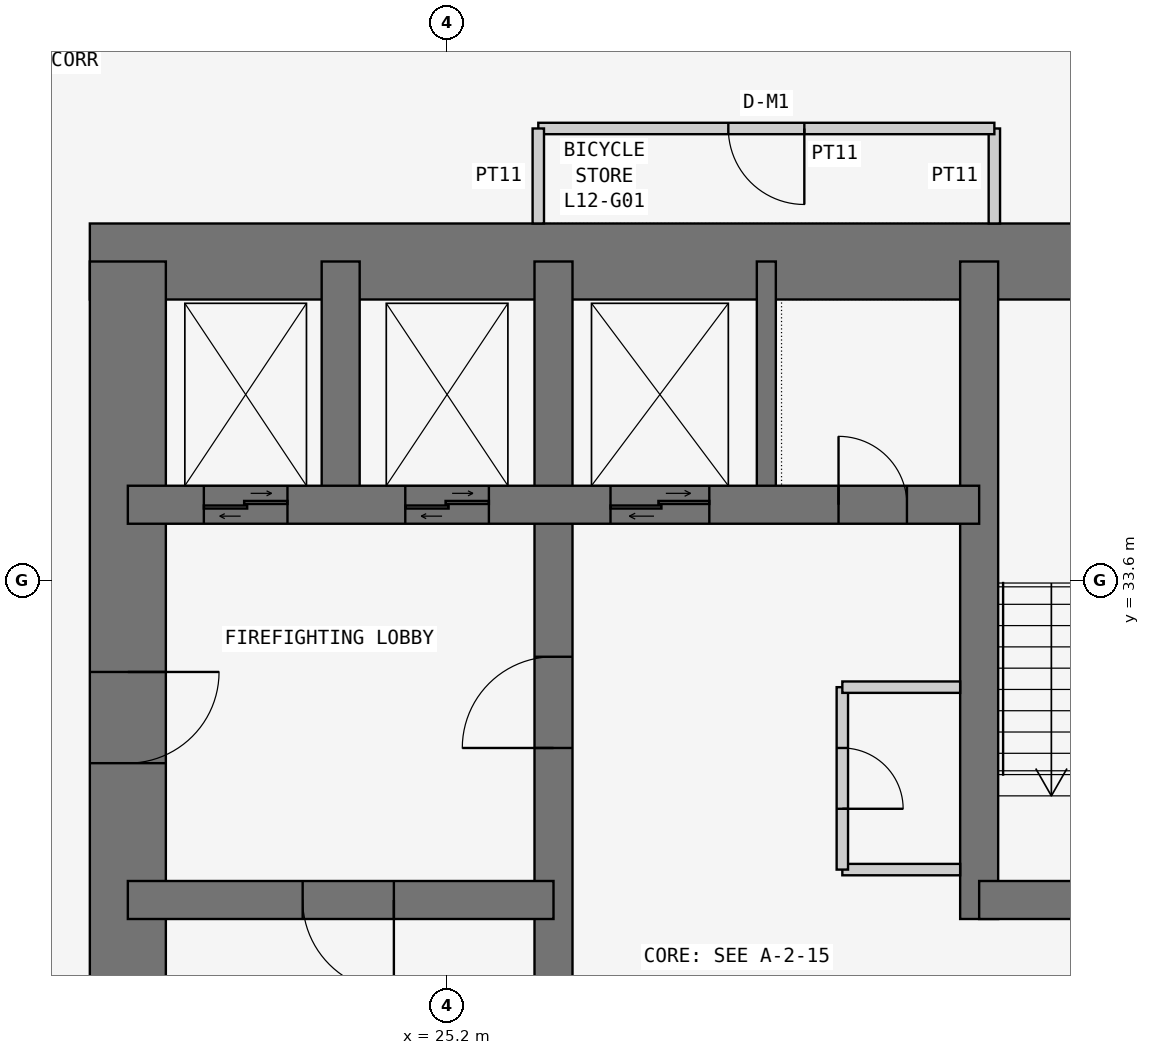
"""IFC4 building model, lengths in metres.
Left out: names, types, materials, properties, quantities, classifications, styles, units other than length and angle.
Written with IfcOpenShell. Run it as: python <this file> out.ifc"""

import sys

from ifc_helpers import new_model, si_unit, direction, frame, frame_2d, origin, place, context, subcontext, project, spatial, rectangle, extrude, element, fill, save


model = new_model("IFC4")
c1 = context("Model", 3, precision=1e-05, world=origin(), true_north=direction((0.0, 1.0)))
c2 = subcontext(c1, "Body", "Model", "MODEL_VIEW")
j1 = project(units=[si_unit("LENGTHUNIT", "METRE"), si_unit("PLANEANGLEUNIT", "RADIAN")], contexts=[c1])
p1 = place(None, origin())
s1 = spatial("IfcSite", under=j1, at=p1, CompositionType="ELEMENT")
p2 = place(p1, origin())
s2 = spatial("IfcBuilding", under=s1, at=p2, CompositionType="ELEMENT")
p3 = place(p2, frame((0.0, 0.0, 52.5)))
s3 = spatial("IfcBuildingStorey", under=s2, at=p3, CompositionType="ELEMENT", Elevation=52.5)
p4 = place(p3, frame((37.8, 37.8, 0.0), z_axis=(0.0, 0.0, 1.0), x_axis=(-1.0, 0.0, 0.0)))
e1 = element("IfcWall", 1, at=p4, inside=s3, PredefinedType="SHEAR", context=c2, shape_type="SweptSolid", body=[
    extrude(rectangle(XDim=17.3, YDim=1.0, at=frame_2d((8.65, 0.0))), origin(), (0.0, 0.0, 1.0), 3.6),
])
p5 = place(p3, frame((21.0, 37.8, 0.0), z_axis=(0.0, 0.0, 1.0), x_axis=(0.0, -1.0, 0.0)))
e2 = element("IfcWall", 2, at=p5, inside=s3, PredefinedType="SHEAR", context=c2, shape_type="SweptSolid", body=[
    extrude(rectangle(XDim=17.3, YDim=1.0, at=frame_2d((8.65, 0.0))), origin(), (0.0, 0.0, 1.0), 3.6),
])
p6 = place(p5, frame((5.4, 0.0, 0.0)))
e3 = element("IfcOpeningElement", 3, at=p6, cuts=e2, PredefinedType="OPENING", context=c2, shape_type="SweptSolid", body=[
    extrude(rectangle(XDim=1.2, YDim=2.1, at=frame_2d((0.6, 1.05))), frame((0.0, 0.51, 0.0), z_axis=(0.0, -1.0, 0.0), x_axis=(1.0, 0.0, 0.0)), (0.0, 0.0, 1.0), 1.02),
])
p7 = place(p3, frame((26.6, 21.0, 0.0), z_axis=(0.0, 0.0, 1.0), x_axis=(0.0, 1.0, 0.0)))
e4 = element("IfcWall", 4, at=p7, inside=s3, PredefinedType="SHEAR", context=c2, shape_type="SweptSolid", body=[
    extrude(rectangle(XDim=16.8, YDim=0.5, at=frame_2d((8.4, 0.0))), origin(), (0.0, 0.0, 1.0), 3.6),
])
p8 = place(p7, frame((10.4, 0.0, 0.0)))
e5 = element("IfcOpeningElement", 5, at=p8, cuts=e4, PredefinedType="OPENING", context=c2, shape_type="SweptSolid", body=[
    extrude(rectangle(XDim=1.2, YDim=2.1, at=frame_2d((0.6, 1.05))), frame((0.0, 0.26, 0.0), z_axis=(0.0, -1.0, 0.0), x_axis=(1.0, 0.0, 0.0)), (0.0, 0.0, 1.0), 0.52),
])
p9 = place(p3, frame((21.0, 29.4, 0.0), z_axis=(0.0, 0.0, 1.0), x_axis=(1.0, 0.0, 0.0)))
e6 = element("IfcWall", 6, at=p9, inside=s3, PredefinedType="SHEAR", context=c2, shape_type="SweptSolid", body=[
    extrude(rectangle(XDim=5.6, YDim=0.5, at=frame_2d((2.8, 0.0))), origin(), (0.0, 0.0, 1.0), 3.6),
])
p10 = place(p9, frame((2.3, 0.0, 0.0)))
e7 = element("IfcOpeningElement", 7, at=p10, cuts=e6, PredefinedType="OPENING", context=c2, shape_type="SweptSolid", body=[
    extrude(rectangle(XDim=1.2, YDim=2.1, at=frame_2d((0.6, 1.05))), frame((0.0, 0.26, 0.0), z_axis=(0.0, -1.0, 0.0), x_axis=(1.0, 0.0, 0.0)), (0.0, 0.0, 1.0), 0.52),
])
p11 = place(p3, frame((21.0, 34.6, 0.0), z_axis=(0.0, 0.0, 1.0), x_axis=(1.0, 0.0, 0.0)))
e8 = element("IfcWall", 8, at=p11, inside=s3, PredefinedType="SHEAR", context=c2, shape_type="SweptSolid", body=[
    extrude(rectangle(XDim=11.2, YDim=0.5, at=frame_2d((5.6, 0.0))), origin(), (0.0, 0.0, 1.0), 3.6),
])
p12 = place(p11, frame((9.35, 0.0, 0.0)))
e9 = element("IfcOpeningElement", 9, at=p12, cuts=e8, PredefinedType="OPENING", context=c2, shape_type="SweptSolid", body=[
    extrude(rectangle(XDim=0.9, YDim=2.1, at=frame_2d((0.45, 1.05))), frame((0.0, 0.26, 0.0), z_axis=(0.0, -1.0, 0.0), x_axis=(1.0, 0.0, 0.0)), (0.0, 0.0, 1.0), 0.52),
])
p13 = place(p11, frame((1.0, 0.0, 0.0)))
e10 = element("IfcOpeningElement", 10, at=p13, cuts=e8, PredefinedType="OPENING", context=c2, shape_type="SweptSolid", body=[
    extrude(rectangle(XDim=1.1, YDim=2.1, at=frame_2d((0.55, 1.05))), frame((0.0, 0.26, 0.0), z_axis=(0.0, -1.0, 0.0), x_axis=(1.0, 0.0, 0.0)), (0.0, 0.0, 1.0), 0.52),
])
p14 = place(p11, frame((3.65, 0.0, 0.0)))
e11 = element("IfcOpeningElement", 11, at=p14, cuts=e8, PredefinedType="OPENING", context=c2, shape_type="SweptSolid", body=[
    extrude(rectangle(XDim=1.1, YDim=2.1, at=frame_2d((0.55, 1.05))), frame((0.0, 0.26, 0.0), z_axis=(0.0, -1.0, 0.0), x_axis=(1.0, 0.0, 0.0)), (0.0, 0.0, 1.0), 0.52),
])
p15 = place(p11, frame((6.35, 0.0, 0.0)))
e12 = element("IfcOpeningElement", 12, at=p15, cuts=e8, PredefinedType="OPENING", context=c2, shape_type="SweptSolid", body=[
    extrude(rectangle(XDim=1.3, YDim=2.1, at=frame_2d((0.65, 1.05))), frame((0.0, 0.26, 0.0), z_axis=(0.0, -1.0, 0.0), x_axis=(1.0, 0.0, 0.0)), (0.0, 0.0, 1.0), 0.52),
])
p16 = place(p3, frame((23.8, 34.6, 0.0), z_axis=(0.0, 0.0, 1.0), x_axis=(0.0, 1.0, 0.0)))
e13 = element("IfcWall", 13, at=p16, inside=s3, PredefinedType="SHEAR", context=c2, shape_type="SweptSolid", body=[
    extrude(rectangle(XDim=3.2, YDim=0.5, at=frame_2d((1.6, 0.0))), origin(), (0.0, 0.0, 1.0), 3.6),
])
p17 = place(p3, frame((32.2, 29.15, 0.0), z_axis=(0.0, 0.0, 1.0), x_axis=(0.0, 1.0, 0.0)))
e14 = element("IfcWall", 14, at=p17, inside=s3, PredefinedType="SHEAR", context=c2, shape_type="SweptSolid", body=[
    extrude(rectangle(XDim=8.65, YDim=0.5, at=frame_2d((4.325, 0.0))), origin(), (0.0, 0.0, 1.0), 3.6),
])
p18 = place(p3, frame((32.2, 29.4, 0.0), z_axis=(0.0, 0.0, 1.0), x_axis=(1.0, 0.0, 0.0)))
e15 = element("IfcWall", 15, at=p18, inside=s3, PredefinedType="SHEAR", context=c2, shape_type="SweptSolid", body=[
    extrude(rectangle(XDim=5.6, YDim=0.5, at=frame_2d((2.8, 0.0))), origin(), (0.0, 0.0, 1.0), 3.6),
])
p19 = place(p18, frame((2.0, 0.0, 0.0)))
e16 = element("IfcOpeningElement", 16, at=p19, cuts=e15, PredefinedType="OPENING", context=c2, shape_type="SweptSolid", body=[
    extrude(rectangle(XDim=1.2, YDim=2.1, at=frame_2d((0.6, 1.05))), frame((0.0, 0.26, 0.0), z_axis=(0.0, -1.0, 0.0), x_axis=(1.0, 0.0, 0.0)), (0.0, 0.0, 1.0), 0.52),
])
p20 = place(p3, frame((29.4, 34.6, 0.0), z_axis=(0.0, 0.0, 1.0), x_axis=(0.0, 1.0, 0.0)))
e17 = element("IfcWall", 17, at=p20, inside=s3, PredefinedType="SHEAR", context=c2, shape_type="SweptSolid", body=[
    extrude(rectangle(XDim=3.2, YDim=0.25, at=frame_2d((1.6, 0.0))), origin(), (0.0, 0.0, 1.0), 3.6),
])
p21 = place(p3, frame((32.4, 38.3, 0.0), z_axis=(0.0, 0.0, 1.0), x_axis=(0.0, 1.0, 0.0)))
e18 = element("IfcWall", 18, at=p21, inside=s3, PredefinedType="PARTITIONING", context=c2, shape_type="SweptSolid", body=[
    extrude(rectangle(XDim=1.25, YDim=0.15, at=frame_2d((0.625, 0.0))), origin(), (0.0, 0.0, 1.0), 3.45),
])
p22 = place(p3, frame((32.4, 39.55, 0.0), z_axis=(0.0, 0.0, 1.0), x_axis=(-1.0, 0.0, 0.0)))
e19 = element("IfcWall", 19, at=p22, inside=s3, PredefinedType="PARTITIONING", context=c2, shape_type="SweptSolid", body=[
    extrude(rectangle(XDim=6.0, YDim=0.15, at=frame_2d((3.0, 0.0))), origin(), (0.0, 0.0, 1.0), 3.45),
])
p23 = place(p22, frame((2.5, 0.0, 0.0)))
e20 = element("IfcOpeningElement", 20, at=p23, cuts=e19, PredefinedType="OPENING", context=c2, shape_type="SweptSolid", body=[
    extrude(rectangle(XDim=1.0, YDim=2.1, at=frame_2d((0.5, 1.05))), frame((0.0, 0.085, 0.0), z_axis=(0.0, -1.0, 0.0), x_axis=(1.0, 0.0, 0.0)), (0.0, 0.0, 1.0), 0.17),
])
p24 = place(p3, frame((26.4, 39.55, 0.0), z_axis=(0.0, 0.0, 1.0), x_axis=(0.0, -1.0, 0.0)))
e21 = element("IfcWall", 21, at=p24, inside=s3, PredefinedType="PARTITIONING", context=c2, shape_type="SweptSolid", body=[
    extrude(rectangle(XDim=1.25, YDim=0.15, at=frame_2d((0.625, 0.0))), origin(), (0.0, 0.0, 1.0), 3.45),
])
p25 = place(p3, frame((31.95, 29.8, 0.0), z_axis=(0.0, 0.0, 1.0), x_axis=(-1.0, 0.0, 0.0)))
e22 = element("IfcWall", 22, at=p25, inside=s3, PredefinedType="PARTITIONING", context=c2, shape_type="SweptSolid", body=[
    extrude(rectangle(XDim=1.55, YDim=0.15, at=frame_2d((0.775, 0.0))), origin(), (0.0, 0.0, 1.0), 3.45),
])
p26 = place(p3, frame((30.4, 29.8, 0.0), z_axis=(0.0, 0.0, 1.0), x_axis=(0.0, 1.0, 0.0)))
e23 = element("IfcWall", 23, at=p26, inside=s3, PredefinedType="PARTITIONING", context=c2, shape_type="SweptSolid", body=[
    extrude(rectangle(XDim=2.4, YDim=0.15, at=frame_2d((1.2, 0.0))), origin(), (0.0, 0.0, 1.0), 3.45),
])
p27 = place(p26, frame((0.8, 0.0, 0.0)))
e24 = element("IfcOpeningElement", 24, at=p27, cuts=e23, PredefinedType="OPENING", context=c2, shape_type="SweptSolid", body=[
    extrude(rectangle(XDim=0.8, YDim=2.1, at=frame_2d((0.4, 1.05))), frame((0.0, 0.085, 0.0), z_axis=(0.0, -1.0, 0.0), x_axis=(1.0, 0.0, 0.0)), (0.0, 0.0, 1.0), 0.17),
])
p28 = place(p3, frame((30.4, 32.2, 0.0), z_axis=(0.0, 0.0, 1.0), x_axis=(1.0, 0.0, 0.0)))
e25 = element("IfcWall", 25, at=p28, inside=s3, PredefinedType="PARTITIONING", context=c2, shape_type="SweptSolid", body=[
    extrude(rectangle(XDim=1.55, YDim=0.15, at=frame_2d((0.775, 0.0))), origin(), (0.0, 0.0, 1.0), 3.45),
])
p29 = place(p23, origin())
e26 = element("IfcDoor", 26, at=p29, inside=s3, OperationType="SINGLE_SWING_LEFT", PredefinedType="DOOR", context=c2, shape_type="SweptSolid", body=[
    extrude(rectangle(XDim=1.0, YDim=2.1, at=frame_2d((0.5, 1.05))), frame((0.0, 0.025, 0.0), z_axis=(0.0, -1.0, 0.0), x_axis=(1.0, 0.0, 0.0)), (0.0, 0.0, 1.0), 0.05),
])
fill(e20, e26)
p30 = place(p6, origin())
e27 = element("IfcDoor", 27, at=p30, inside=s3, OperationType="SINGLE_SWING_LEFT", PredefinedType="DOOR", context=c2, shape_type="SweptSolid", body=[
    extrude(rectangle(XDim=1.2, YDim=2.1, at=frame_2d((0.6, 1.05))), frame((0.0, 0.025, 0.0), z_axis=(0.0, -1.0, 0.0), x_axis=(1.0, 0.0, 0.0)), (0.0, 0.0, 1.0), 0.05),
])
fill(e3, e27)
p31 = place(p10, frame((1.2, 0.0, 0.0), z_axis=(0.0, 0.0, 1.0), x_axis=(-1.0, 0.0, 0.0)))
e28 = element("IfcDoor", 28, at=p31, inside=s3, OperationType="SINGLE_SWING_LEFT", PredefinedType="DOOR", context=c2, shape_type="SweptSolid", body=[
    extrude(rectangle(XDim=1.2, YDim=2.1, at=frame_2d((0.6, 1.05))), frame((0.0, 0.025, 0.0), z_axis=(0.0, -1.0, 0.0), x_axis=(1.0, 0.0, 0.0)), (0.0, 0.0, 1.0), 0.05),
])
fill(e7, e28)
p32 = place(p8, origin())
e29 = element("IfcDoor", 29, at=p32, inside=s3, OperationType="SINGLE_SWING_LEFT", PredefinedType="DOOR", context=c2, shape_type="SweptSolid", body=[
    extrude(rectangle(XDim=1.2, YDim=2.1, at=frame_2d((0.6, 1.05))), frame((0.0, 0.025, 0.0), z_axis=(0.0, -1.0, 0.0), x_axis=(1.0, 0.0, 0.0)), (0.0, 0.0, 1.0), 0.05),
])
fill(e5, e29)
p33 = place(p12, origin())
e30 = element("IfcDoor", 30, at=p33, inside=s3, OperationType="SINGLE_SWING_LEFT", PredefinedType="DOOR", context=c2, shape_type="SweptSolid", body=[
    extrude(rectangle(XDim=0.9, YDim=2.1, at=frame_2d((0.45, 1.05))), frame((0.0, 0.025, 0.0), z_axis=(0.0, -1.0, 0.0), x_axis=(1.0, 0.0, 0.0)), (0.0, 0.0, 1.0), 0.05),
])
fill(e9, e30)
p34 = place(p27, frame((0.8, 0.0, 0.0), z_axis=(0.0, 0.0, 1.0), x_axis=(-1.0, 0.0, 0.0)))
e31 = element("IfcDoor", 31, at=p34, inside=s3, OperationType="SINGLE_SWING_RIGHT", PredefinedType="DOOR", context=c2, shape_type="SweptSolid", body=[
    extrude(rectangle(XDim=0.8, YDim=2.1, at=frame_2d((0.4, 1.05))), frame((0.0, 0.025, 0.0), z_axis=(0.0, -1.0, 0.0), x_axis=(1.0, 0.0, 0.0)), (0.0, 0.0, 1.0), 0.05),
])
fill(e24, e31)
p35 = place(p13, origin())
e32 = element("IfcDoor", 32, at=p35, inside=s3, OperationType="DOUBLE_DOOR_SLIDING", PredefinedType="DOOR", context=c2, shape_type="SweptSolid", body=[
    extrude(rectangle(XDim=1.1, YDim=2.1, at=frame_2d((0.55, 1.05))), frame((0.0, 0.025, 0.0), z_axis=(0.0, -1.0, 0.0), x_axis=(1.0, 0.0, 0.0)), (0.0, 0.0, 1.0), 0.05),
])
fill(e10, e32)
p36 = place(p14, origin())
e33 = element("IfcDoor", 33, at=p36, inside=s3, OperationType="DOUBLE_DOOR_SLIDING", PredefinedType="DOOR", context=c2, shape_type="SweptSolid", body=[
    extrude(rectangle(XDim=1.1, YDim=2.1, at=frame_2d((0.55, 1.05))), frame((0.0, 0.025, 0.0), z_axis=(0.0, -1.0, 0.0), x_axis=(1.0, 0.0, 0.0)), (0.0, 0.0, 1.0), 0.05),
])
fill(e11, e33)
p37 = place(p15, origin())
e34 = element("IfcDoor", 34, at=p37, inside=s3, OperationType="DOUBLE_DOOR_SLIDING", PredefinedType="DOOR", context=c2, shape_type="SweptSolid", body=[
    extrude(rectangle(XDim=1.3, YDim=2.1, at=frame_2d((0.65, 1.05))), frame((0.0, 0.025, 0.0), z_axis=(0.0, -1.0, 0.0), x_axis=(1.0, 0.0, 0.0)), (0.0, 0.0, 1.0), 0.05),
])
fill(e12, e34)
save(model, sys.argv[1])
